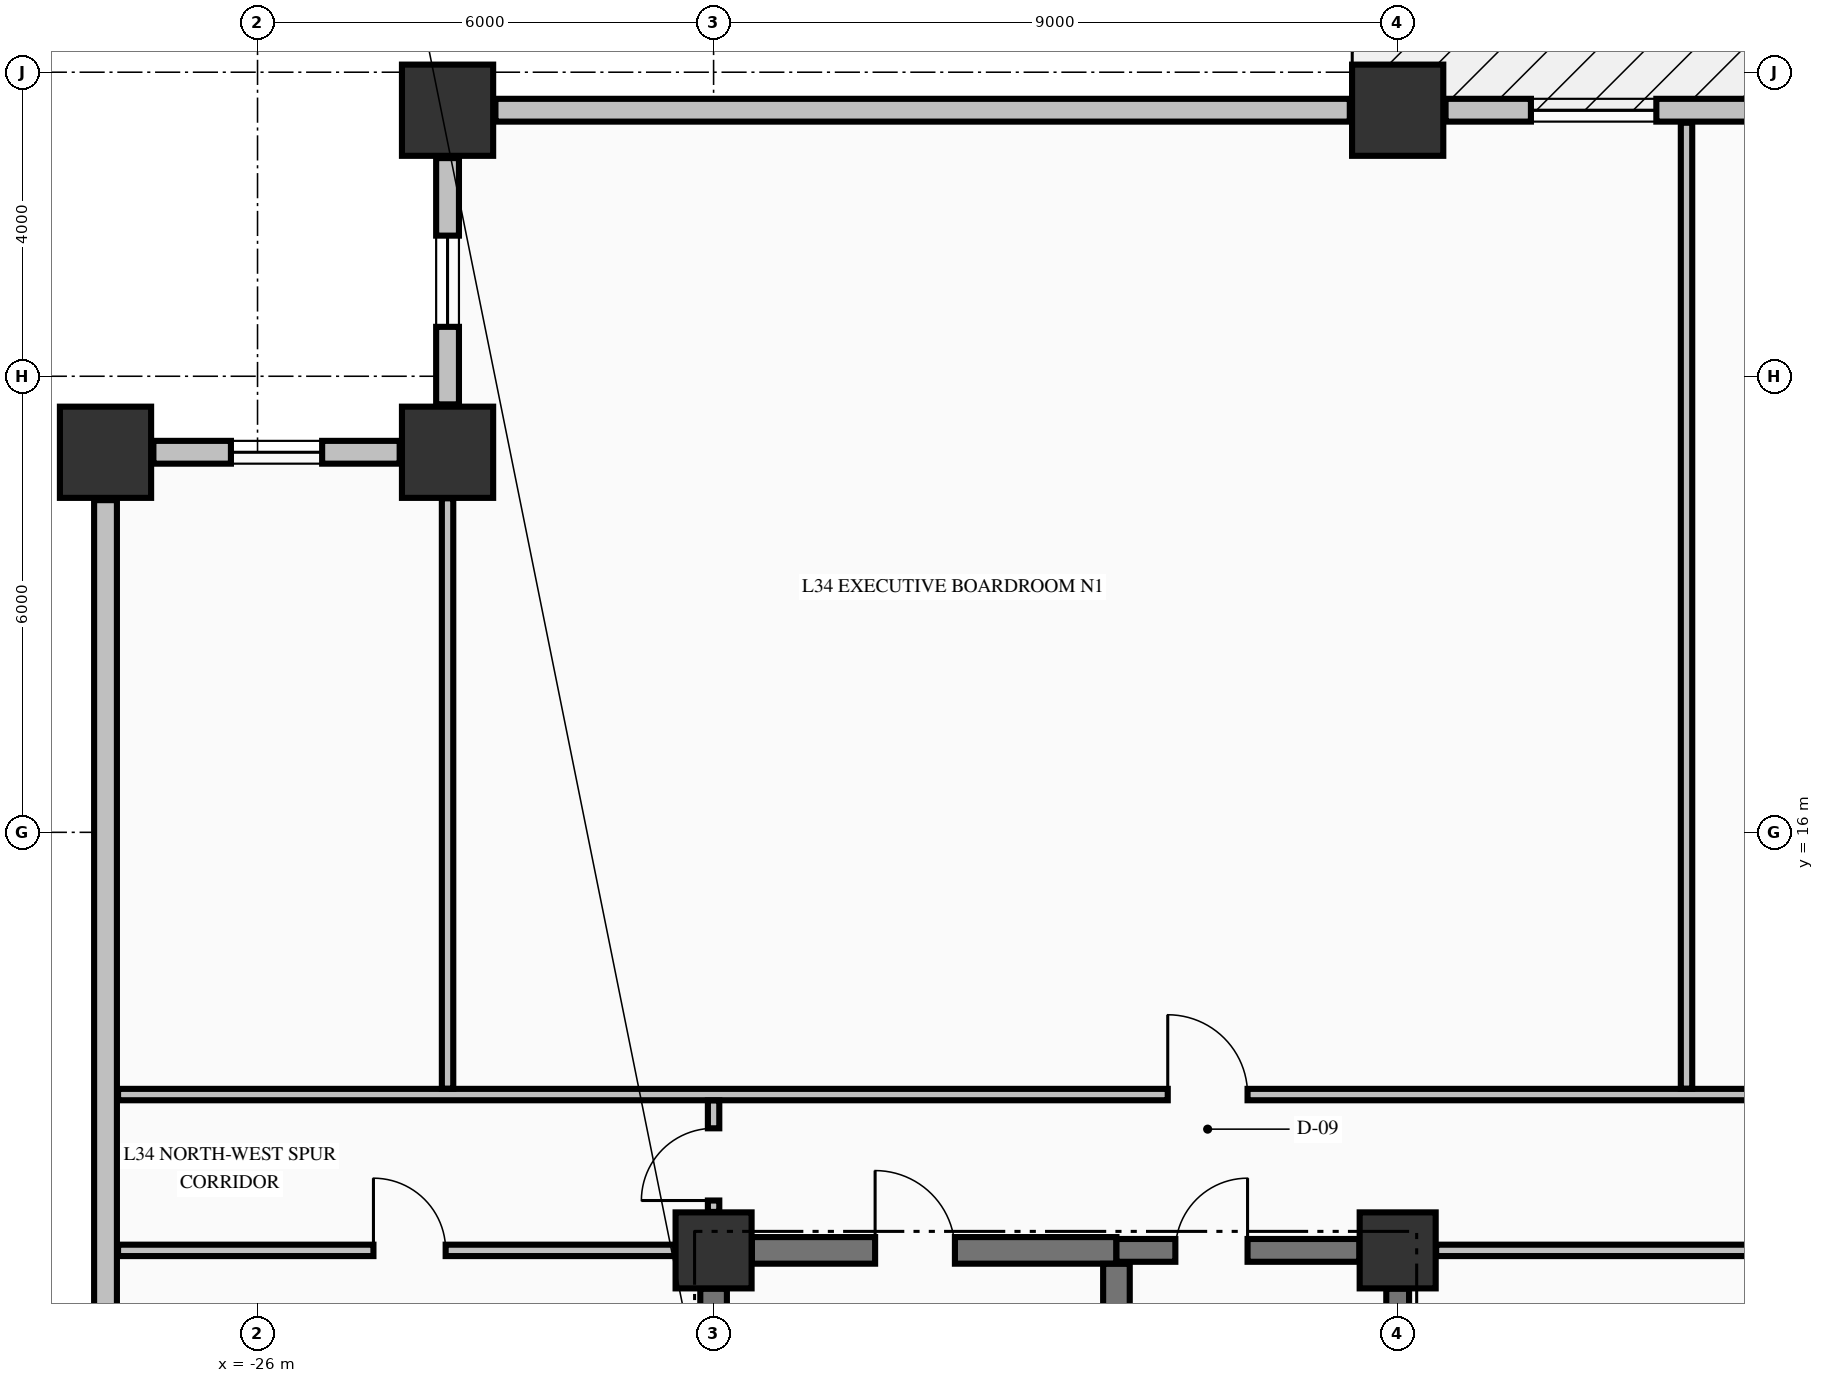
"""IFC4 building model, lengths in metres.
Left out: names, types, materials, properties, quantities, classifications, styles, units other than length and angle.
Written with IfcOpenShell. Run it as: python <this file> out.ifc"""

import sys

from ifc_helpers import new_model, si_unit, direction, frame, frame_2d, origin, origin_2d, place, context, subcontext, project, spatial, rectangle, extrude, element, fill, save


model = new_model("IFC4")
c1 = context("Model", 3, precision=1e-05, world=origin(), true_north=direction((0.0, 1.0)))
c2 = subcontext(c1, "Body", "Model", "MODEL_VIEW")
j1 = project(units=[si_unit("LENGTHUNIT", "METRE"), si_unit("PLANEANGLEUNIT", "RADIAN")], contexts=[c1])
p1 = place(None, origin())
s1 = spatial("IfcSite", under=j1, at=p1, CompositionType="ELEMENT")
p2 = place(p1, origin())
s2 = spatial("IfcBuilding", under=s1, at=p2, CompositionType="ELEMENT")
p3 = place(p2, frame((0.0, 0.0, 135.63)))
s3 = spatial("IfcBuildingStorey", under=s2, at=p3, CompositionType="ELEMENT", Elevation=135.63)
for number, where, z_axis, x_axis in (
    (1, (-23.5, 25.5, -0.25), (0.0, 0.0, 1.0), (1.0, 0.0, 0.0)),
    (2, (-11.0, 25.5, -0.25), (0.0, 0.0, 1.0), (1.0, 0.0, 0.0)),
    (3, (-28.0, 21.0, -0.25), (0.0, 0.0, 1.0), (1.0, 0.0, 0.0)),
    (4, (-23.5, 21.0, -0.25), (0.0, 0.0, 1.0), (1.0, 0.0, 0.0)),
):
    element("IfcColumn", number, at=place(p3, frame(where, z_axis=z_axis, x_axis=x_axis)), inside=s3, PredefinedType="COLUMN", context=c2, shape_type="SweptSolid", body=[
        extrude(rectangle(XDim=1.2, YDim=1.2, at=origin_2d()), origin(), (0.0, 0.0, 1.0), 3.57),
    ])
for number, where, z_axis, x_axis in (
    (5, (-20.0, 10.5, -0.25), (0.0, 0.0, 1.0), (1.0, 0.0, 0.0)),
    (6, (-11.0, 10.5, -0.25), (0.0, 0.0, 1.0), (1.0, 0.0, 0.0)),
):
    element("IfcColumn", number, at=place(p3, frame(where, z_axis=z_axis, x_axis=x_axis)), inside=s3, PredefinedType="COLUMN", context=c2, shape_type="SweptSolid", body=[
        extrude(rectangle(XDim=1.0, YDim=1.0, at=origin_2d()), origin(), (0.0, 0.0, 1.0), 3.57),
    ])
p4 = place(p3, frame((-23.5, 24.87, 0.0), z_axis=(0.0, 0.0, 1.0), x_axis=(0.0, -1.0, 0.0)))
e7 = element("IfcWall", 7, at=p4, inside=s3, PredefinedType="STANDARD", context=c2, shape_type="SweptSolid", body=[
    extrude(rectangle(XDim=3.24, YDim=0.3, at=frame_2d((1.62, 0.0))), origin(), (0.0, 0.0, 1.0), 2.712),
])
p5 = place(p4, frame((1.02, 0.0, 0.82)))
e8 = element("IfcOpeningElement", 8, at=p5, cuts=e7, PredefinedType="OPENING", context=c2, shape_type="SweptSolid", body=[
    extrude(rectangle(XDim=1.2, YDim=1.65, at=frame_2d((0.6, 0.825))), frame((0.0, 0.16, 0.0), z_axis=(0.0, -1.0, 0.0), x_axis=(1.0, 0.0, 0.0)), (0.0, 0.0, 1.0), 0.32),
])
p6 = place(p3, frame((-24.13, 21.0, 0.0), z_axis=(0.0, 0.0, 1.0), x_axis=(-1.0, 0.0, 0.0)))
e9 = element("IfcWall", 9, at=p6, inside=s3, PredefinedType="STANDARD", context=c2, shape_type="SweptSolid", body=[
    extrude(rectangle(XDim=3.24, YDim=0.3, at=frame_2d((1.62, 0.0))), origin(), (0.0, 0.0, 1.0), 2.712),
])
p7 = place(p6, frame((1.02, 0.0, 0.82)))
e10 = element("IfcOpeningElement", 10, at=p7, cuts=e9, PredefinedType="OPENING", context=c2, shape_type="SweptSolid", body=[
    extrude(rectangle(XDim=1.2, YDim=1.65, at=frame_2d((0.6, 0.825))), frame((0.0, 0.16, 0.0), z_axis=(0.0, -1.0, 0.0), x_axis=(1.0, 0.0, 0.0)), (0.0, 0.0, 1.0), 0.32),
])
p8 = place(p3, frame((-11.63, 25.5, 0.0), z_axis=(0.0, 0.0, 1.0), x_axis=(-1.0, 0.0, 0.0)))
e11 = element("IfcWall", 11, at=p8, inside=s3, PredefinedType="STANDARD", context=c2, shape_type="SweptSolid", body=[
    extrude(rectangle(XDim=11.24, YDim=0.3, at=frame_2d((5.62, 0.0))), origin(), (0.0, 0.0, 1.0), 2.712),
])
p9 = place(p3, frame((-0.63, 25.5, 0.0), z_axis=(0.0, 0.0, 1.0), x_axis=(-1.0, 0.0, 0.0)))
e12 = element("IfcWall", 12, at=p9, inside=s3, PredefinedType="STANDARD", context=c2, shape_type="SweptSolid", body=[
    extrude(rectangle(XDim=9.74, YDim=0.3, at=frame_2d((4.87, 0.0))), origin(), (0.0, 0.0, 1.0), 2.712),
])
p10 = place(p9, frame((0.887, 0.0, 0.0)))
e13 = element("IfcOpeningElement", 13, at=p10, cuts=e12, PredefinedType="OPENING", context=c2, shape_type="SweptSolid", body=[
    extrude(rectangle(XDim=1.1, YDim=2.15, at=frame_2d((0.55, 1.075))), frame((0.0, 0.16, 0.0), z_axis=(0.0, -1.0, 0.0), x_axis=(1.0, 0.0, 0.0)), (0.0, 0.0, 1.0), 0.32),
])
p11 = place(p9, frame((3.071, 0.0, 0.8)))
e14 = element("IfcOpeningElement", 14, at=p11, cuts=e12, PredefinedType="OPENING", context=c2, shape_type="SweptSolid", body=[
    extrude(rectangle(XDim=1.65, YDim=1.7, at=frame_2d((0.825, 0.85))), frame((0.0, 0.16, 0.0), z_axis=(0.0, -1.0, 0.0), x_axis=(1.0, 0.0, 0.0)), (0.0, 0.0, 1.0), 0.32),
])
p12 = place(p9, frame((6.967, 0.0, 0.8)))
e15 = element("IfcOpeningElement", 15, at=p12, cuts=e12, PredefinedType="OPENING", context=c2, shape_type="SweptSolid", body=[
    extrude(rectangle(XDim=1.65, YDim=1.7, at=frame_2d((0.825, 0.85))), frame((0.0, 0.16, 0.0), z_axis=(0.0, -1.0, 0.0), x_axis=(1.0, 0.0, 0.0)), (0.0, 0.0, 1.0), 0.32),
])
p13 = place(p3, frame((-28.0, 20.37, 0.0), z_axis=(0.0, 0.0, 1.0), x_axis=(0.0, -1.0, 0.0)))
e16 = element("IfcWall", 16, at=p13, inside=s3, PredefinedType="STANDARD", context=c2, shape_type="SweptSolid", body=[
    extrude(rectangle(XDim=10.74, YDim=0.3, at=frame_2d((5.37, 0.0))), origin(), (0.0, 0.0, 1.0), 2.712),
])
p14 = place(p3, frame((-19.496, 10.5, 0.0), z_axis=(0.0, 0.0, 1.0), x_axis=(1.0, 0.0, 0.0)))
e17 = element("IfcWall", 17, at=p14, inside=s3, PredefinedType="SHEAR", context=c2, shape_type="SweptSolid", body=[
    extrude(rectangle(XDim=4.796, YDim=0.35, at=frame_2d((2.398, 0.0))), origin(), (0.0, 0.0, 1.0), 3.32),
])
p15 = place(p14, frame((1.621, 0.0, 0.0)))
e18 = element("IfcOpeningElement", 18, at=p15, cuts=e17, PredefinedType="OPENING", context=c2, shape_type="SweptSolid", body=[
    extrude(rectangle(XDim=1.05, YDim=2.15, at=frame_2d((0.525, 1.075))), frame((0.0, 0.185, 0.0), z_axis=(0.0, -1.0, 0.0), x_axis=(1.0, 0.0, 0.0)), (0.0, 0.0, 1.0), 0.37),
])
p16 = place(p3, frame((-14.7, 10.5, 0.0), z_axis=(0.0, 0.0, 1.0), x_axis=(1.0, 0.0, 0.0)))
e19 = element("IfcWall", 19, at=p16, inside=s3, PredefinedType="SHEAR", context=c2, shape_type="SweptSolid", body=[
    extrude(rectangle(XDim=3.196, YDim=0.3, at=frame_2d((1.598, 0.0))), origin(), (0.0, 0.0, 1.0), 3.32),
])
p17 = place(p16, frame((0.775, 0.0, 0.0)))
e20 = element("IfcOpeningElement", 20, at=p17, cuts=e19, PredefinedType="OPENING", context=c2, shape_type="SweptSolid", body=[
    extrude(rectangle(XDim=0.95, YDim=2.15, at=frame_2d((0.475, 1.075))), frame((0.0, 0.16, 0.0), z_axis=(0.0, -1.0, 0.0), x_axis=(1.0, 0.0, 0.0)), (0.0, 0.0, 1.0), 0.32),
])
p18 = place(p3, frame((-27.835, 10.5, 0.0), z_axis=(0.0, 0.0, 1.0), x_axis=(1.0, 0.0, 0.0)))
e21 = element("IfcWall", 21, at=p18, inside=s3, PredefinedType="PARTITIONING", context=c2, shape_type="SweptSolid", body=[
    extrude(rectangle(XDim=7.329, YDim=0.15, at=frame_2d((3.665, 0.0))), origin(), (0.0, 0.0, 1.0), 3.32),
])
p19 = place(p18, frame((3.36, 0.0, 0.0)))
e22 = element("IfcOpeningElement", 22, at=p19, cuts=e21, PredefinedType="OPENING", context=c2, shape_type="SweptSolid", body=[
    extrude(rectangle(XDim=0.95, YDim=2.15, at=frame_2d((0.475, 1.075))), frame((0.0, 0.085, 0.0), z_axis=(0.0, -1.0, 0.0), x_axis=(1.0, 0.0, 0.0)), (0.0, 0.0, 1.0), 0.17),
])
p20 = place(p3, frame((-10.494, 10.5, 0.0), z_axis=(0.0, 0.0, 1.0), x_axis=(1.0, 0.0, 0.0)))
e23 = element("IfcWall", 23, at=p20, inside=s3, PredefinedType="PARTITIONING", context=c2, shape_type="SweptSolid", body=[
    extrude(rectangle(XDim=20.988, YDim=0.15, at=frame_2d((10.494, 0.0))), origin(), (0.0, 0.0, 1.0), 3.32),
])
p21 = place(p20, frame((8.194, 0.0, 0.0)))
e24 = element("IfcOpeningElement", 24, at=p21, cuts=e23, PredefinedType="OPENING", context=c2, shape_type="SweptSolid", body=[
    extrude(rectangle(XDim=1.1, YDim=2.15, at=frame_2d((0.55, 1.075))), frame((0.0, 0.085, 0.0), z_axis=(0.0, -1.0, 0.0), x_axis=(1.0, 0.0, 0.0)), (0.0, 0.0, 1.0), 0.17),
])
p22 = place(p3, frame((-27.835, 12.55, 0.0), z_axis=(0.0, 0.0, 1.0), x_axis=(1.0, 0.0, 0.0)))
e25 = element("IfcWall", 25, at=p22, inside=s3, PredefinedType="PARTITIONING", context=c2, shape_type="SweptSolid", body=[
    extrude(rectangle(XDim=50.67, YDim=0.15, at=frame_2d((25.335, 0.0))), origin(), (0.0, 0.0, 1.0), 3.32),
])
p23 = place(p22, frame((13.81, 0.0, 0.0)))
e26 = element("IfcOpeningElement", 26, at=p23, cuts=e25, PredefinedType="OPENING", context=c2, shape_type="SweptSolid", body=[
    extrude(rectangle(XDim=1.05, YDim=2.15, at=frame_2d((0.525, 1.075))), frame((0.0, 0.085, 0.0), z_axis=(0.0, -1.0, 0.0), x_axis=(1.0, 0.0, 0.0)), (0.0, 0.0, 1.0), 0.17),
])
p24 = place(p22, frame((25.11, 0.0, 0.0)))
e27 = element("IfcOpeningElement", 27, at=p24, cuts=e25, PredefinedType="OPENING", context=c2, shape_type="SweptSolid", body=[
    extrude(rectangle(XDim=1.05, YDim=2.15, at=frame_2d((0.525, 1.075))), frame((0.0, 0.085, 0.0), z_axis=(0.0, -1.0, 0.0), x_axis=(1.0, 0.0, 0.0)), (0.0, 0.0, 1.0), 0.17),
])
p25 = place(p22, frame((44.16, 0.0, 0.0)))
e28 = element("IfcOpeningElement", 28, at=p25, cuts=e25, PredefinedType="OPENING", context=c2, shape_type="SweptSolid", body=[
    extrude(rectangle(XDim=1.05, YDim=2.15, at=frame_2d((0.525, 1.075))), frame((0.0, 0.085, 0.0), z_axis=(0.0, -1.0, 0.0), x_axis=(1.0, 0.0, 0.0)), (0.0, 0.0, 1.0), 0.17),
])
p26 = place(p3, frame((-20.0, 0.504, 0.0), z_axis=(0.0, 0.0, 1.0), x_axis=(0.0, 1.0, 0.0)))
e29 = element("IfcWall", 29, at=p26, inside=s3, PredefinedType="SHEAR", context=c2, shape_type="SweptSolid", body=[
    extrude(rectangle(XDim=9.492, YDim=0.35, at=frame_2d((4.746, 0.0))), origin(), (0.0, 0.0, 1.0), 3.32),
])
p27 = place(p3, frame((-14.7, 5.852, 0.0), z_axis=(0.0, 0.0, 1.0), x_axis=(0.0, 1.0, 0.0)))
e30 = element("IfcWall", 30, at=p27, inside=s3, PredefinedType="SHEAR", context=c2, shape_type="SweptSolid", body=[
    extrude(rectangle(XDim=4.471, YDim=0.35, at=frame_2d((2.235, 0.0))), origin(), (0.0, 0.0, 1.0), 3.32),
])
p28 = place(p3, frame((-11.0, 5.852, 0.0), z_axis=(0.0, 0.0, 1.0), x_axis=(0.0, 1.0, 0.0)))
e31 = element("IfcWall", 31, at=p28, inside=s3, PredefinedType="SHEAR", context=c2, shape_type="SweptSolid", body=[
    extrude(rectangle(XDim=4.144, YDim=0.3, at=frame_2d((2.072, 0.0))), origin(), (0.0, 0.0, 1.0), 3.32),
])
p29 = place(p3, frame((-23.5, 12.628, 0.0), z_axis=(0.0, 0.0, 1.0), x_axis=(0.0, 1.0, 0.0)))
e32 = element("IfcWall", 32, at=p29, inside=s3, PredefinedType="PARTITIONING", context=c2, shape_type="SweptSolid", body=[
    extrude(rectangle(XDim=7.766, YDim=0.15, at=frame_2d((3.883, 0.0))), origin(), (0.0, 0.0, 1.0), 3.32),
])
p30 = place(p3, frame((-20.0, 11.006, 0.0), z_axis=(0.0, 0.0, 1.0), x_axis=(0.0, 1.0, 0.0)))
e33 = element("IfcWall", 33, at=p30, inside=s3, PredefinedType="PARTITIONING", context=c2, shape_type="SweptSolid", body=[
    extrude(rectangle(XDim=1.466, YDim=0.15, at=frame_2d((0.733, 0.0))), origin(), (0.0, 0.0, 1.0), 2.81),
])
p31 = place(p30, frame((0.15, 0.0, 0.0)))
e34 = element("IfcOpeningElement", 34, at=p31, cuts=e33, PredefinedType="OPENING", context=c2, shape_type="SweptSolid", body=[
    extrude(rectangle(XDim=0.95, YDim=2.15, at=frame_2d((0.475, 1.075))), frame((0.0, 0.085, 0.0), z_axis=(0.0, -1.0, 0.0), x_axis=(1.0, 0.0, 0.0)), (0.0, 0.0, 1.0), 0.17),
])
p32 = place(p3, frame((-7.2, 12.628, 0.0), z_axis=(0.0, 0.0, 1.0), x_axis=(0.0, 1.0, 0.0)))
e35 = element("IfcWall", 35, at=p32, inside=s3, PredefinedType="PARTITIONING", context=c2, shape_type="SweptSolid", body=[
    extrude(rectangle(XDim=12.707, YDim=0.15, at=frame_2d((6.354, 0.0))), origin(), (0.0, 0.0, 1.0), 3.32),
])
p33 = place(p5, origin())
e36 = element("IfcWindow", 36, at=p33, inside=s3, PartitioningType="SINGLE_PANEL", PredefinedType="WINDOW", context=c2, shape_type="SweptSolid", body=[
    extrude(rectangle(XDim=1.2, YDim=1.65, at=frame_2d((0.6, 0.825))), frame((0.0, 0.03, 0.0), z_axis=(0.0, -1.0, 0.0), x_axis=(1.0, 0.0, 0.0)), (0.0, 0.0, 1.0), 0.06),
])
fill(e8, e36)
p34 = place(p7, origin())
e37 = element("IfcWindow", 37, at=p34, inside=s3, PartitioningType="SINGLE_PANEL", PredefinedType="WINDOW", context=c2, shape_type="SweptSolid", body=[
    extrude(rectangle(XDim=1.2, YDim=1.65, at=frame_2d((0.6, 0.825))), frame((0.0, 0.03, 0.0), z_axis=(0.0, -1.0, 0.0), x_axis=(1.0, 0.0, 0.0)), (0.0, 0.0, 1.0), 0.06),
])
fill(e10, e37)
p35 = place(p12, origin())
e38 = element("IfcWindow", 38, at=p35, inside=s3, PartitioningType="SINGLE_PANEL", PredefinedType="WINDOW", context=c2, shape_type="SweptSolid", body=[
    extrude(rectangle(XDim=1.65, YDim=1.7, at=frame_2d((0.825, 0.85))), frame((0.0, 0.03, 0.0), z_axis=(0.0, -1.0, 0.0), x_axis=(1.0, 0.0, 0.0)), (0.0, 0.0, 1.0), 0.06),
])
fill(e15, e38)
p36 = place(p17, origin())
e39 = element("IfcDoor", 39, at=p36, inside=s3, OperationType="SINGLE_SWING_RIGHT", PredefinedType="DOOR", context=c2, shape_type="SweptSolid", body=[
    extrude(rectangle(XDim=0.95, YDim=2.15, at=frame_2d((0.475, 1.075))), frame((0.0, 0.025, 0.0), z_axis=(0.0, -1.0, 0.0), x_axis=(1.0, 0.0, 0.0)), (0.0, 0.0, 1.0), 0.05),
])
fill(e20, e39)
p37 = place(p15, origin())
e40 = element("IfcDoor", 40, at=p37, inside=s3, OperationType="SINGLE_SWING_LEFT", PredefinedType="DOOR", context=c2, shape_type="SweptSolid", body=[
    extrude(rectangle(XDim=1.05, YDim=2.15, at=frame_2d((0.525, 1.075))), frame((0.0, 0.025, 0.0), z_axis=(0.0, -1.0, 0.0), x_axis=(1.0, 0.0, 0.0)), (0.0, 0.0, 1.0), 0.05),
])
fill(e18, e40)
p38 = place(p23, origin())
e41 = element("IfcDoor", 41, at=p38, inside=s3, OperationType="SINGLE_SWING_LEFT", PredefinedType="DOOR", context=c2, shape_type="SweptSolid", body=[
    extrude(rectangle(XDim=1.05, YDim=2.15, at=frame_2d((0.525, 1.075))), frame((0.0, 0.025, 0.0), z_axis=(0.0, -1.0, 0.0), x_axis=(1.0, 0.0, 0.0)), (0.0, 0.0, 1.0), 0.05),
])
fill(e26, e41)
p39 = place(p31, origin())
e42 = element("IfcDoor", 42, at=p39, inside=s3, OperationType="SINGLE_SWING_LEFT", PredefinedType="DOOR", context=c2, shape_type="SweptSolid", body=[
    extrude(rectangle(XDim=0.95, YDim=2.15, at=frame_2d((0.475, 1.075))), frame((0.0, 0.025, 0.0), z_axis=(0.0, -1.0, 0.0), x_axis=(1.0, 0.0, 0.0)), (0.0, 0.0, 1.0), 0.05),
])
fill(e34, e42)
p40 = place(p19, origin())
e43 = element("IfcDoor", 43, at=p40, inside=s3, OperationType="SINGLE_SWING_LEFT", PredefinedType="DOOR", context=c2, shape_type="SweptSolid", body=[
    extrude(rectangle(XDim=0.95, YDim=2.15, at=frame_2d((0.475, 1.075))), frame((0.0, 0.025, 0.0), z_axis=(0.0, -1.0, 0.0), x_axis=(1.0, 0.0, 0.0)), (0.0, 0.0, 1.0), 0.05),
])
fill(e22, e43)
save(model, sys.argv[1])
